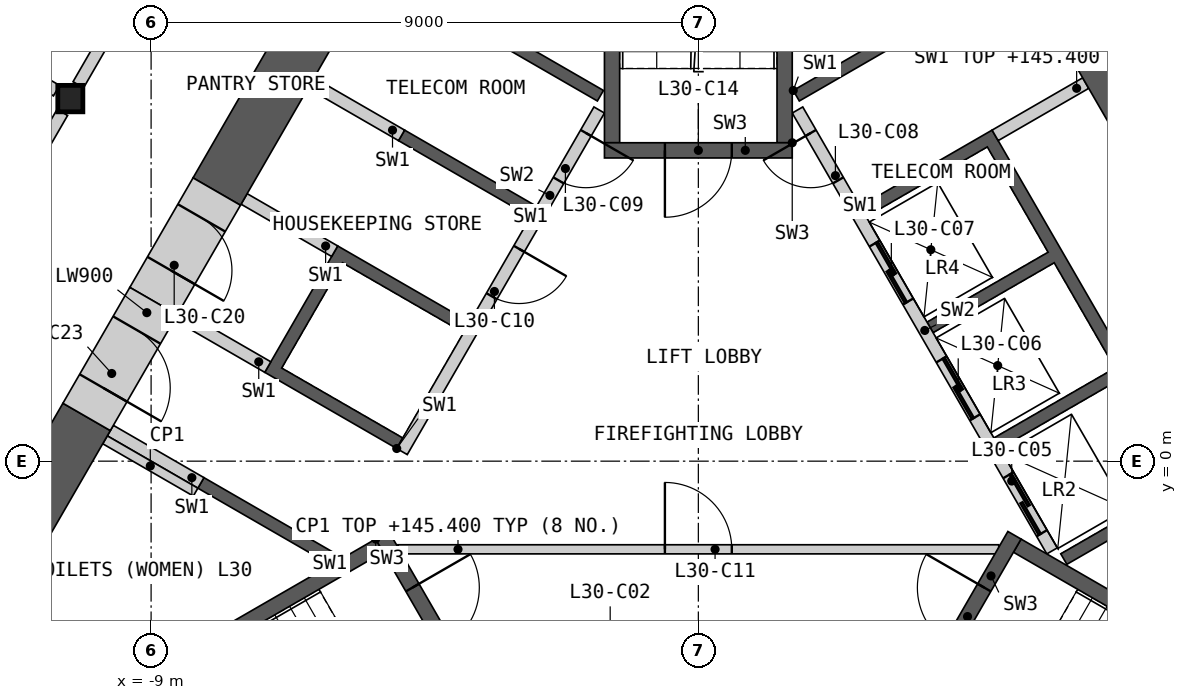
"""IFC4 building model, lengths in metres.
Left out: names, types, materials, properties, quantities, classifications, styles, units other than length and angle.
Written with IfcOpenShell. Run it as: python <this file> out.ifc"""

import sys

from ifc_helpers import new_model, si_unit, direction, frame, frame_2d, origin, origin_2d, place, context, subcontext, project, spatial, polyline, rectangle, i_section, outline, extrude, element, fill, save


model = new_model("IFC4")
c1 = context("Model", 3, precision=1e-05, world=origin(), true_north=direction((0.0, 1.0)))
c2 = subcontext(c1, "Body", "Model", "MODEL_VIEW")
j1 = project(units=[si_unit("LENGTHUNIT", "METRE"), si_unit("PLANEANGLEUNIT", "RADIAN")], contexts=[c1])
p1 = place(None, origin())
s1 = spatial("IfcSite", under=j1, at=p1, CompositionType="ELEMENT")
p2 = place(p1, origin())
s2 = spatial("IfcBuilding", under=s1, at=p2, CompositionType="ELEMENT")
p3 = place(p2, frame((0.0, 0.0, 141.6)))
s3 = spatial("IfcBuildingStorey", under=s2, at=p3, CompositionType="ELEMENT", Elevation=141.6)
p4 = place(p3, frame((-10.328, 5.963, 0.0), z_axis=(0.0, 0.0, 1.0), x_axis=(1.0, 0.0, 0.0)))
e1 = element("IfcColumn", 1, at=p4, inside=s3, PredefinedType="COLUMN", context=c2, shape_type="SweptSolid", body=[
    extrude(i_section(OverallWidth=0.412, OverallDepth=0.435, WebThickness=0.036, FlangeThickness=0.057, at=origin_2d()), origin(), (0.0, 0.0, 1.0), 4.2),
])
p5 = place(p3, origin())
e2 = element("IfcWall", 2, at=p5, inside=s3, PredefinedType="SHEAR", context=c2, shape_type="SweptSolid", body=[
    extrude(outline(polyline([(1.561, 6.097), (3.731, 7.35), (3.831, 7.177), (1.66, 5.924), (1.561, 6.097)])), origin(), (0.0, 0.0, 1.0), 3.8),
])
p6 = place(p3, origin())
e3 = element("IfcWall", 3, at=p6, inside=s3, PredefinedType="SHEAR", context=c2, shape_type="SweptSolid", body=[
    extrude(outline(polyline([(2.66, 4.192), (4.831, 5.445), (8.231, -0.444), (6.061, -1.697), (5.96, -1.524), (7.952, -0.374), (6.952, 1.358), (4.96, 0.208), (4.861, 0.381), (6.852, 1.531), (5.852, 3.263), (3.861, 2.113), (3.76, 2.287), (5.752, 3.437), (4.752, 5.169), (2.76, 4.019), (2.66, 4.192)])), origin(), (0.0, 0.0, 1.0), 3.8),
])
p7 = place(p3, frame((5.817, -1.476, 0.0), z_axis=(0.0, 0.0, 1.0), x_axis=(-0.500002616675, 0.866023893041, 0.0)))
e4 = element("IfcWall", 4, at=p7, inside=s3, PredefinedType="SOLIDWALL", context=c2, shape_type="SweptSolid", body=[
    extrude(rectangle(XDim=8.373, YDim=0.2, at=frame_2d((4.187, 0.0))), origin(), (0.0, 0.0, 1.0), 3.8),
])
p8 = place(p7, frame((0.337, 0.0, 0.0)))
e5 = element("IfcOpeningElement", 5, at=p8, cuts=e4, PredefinedType="OPENING", context=c2, shape_type="SweptSolid", body=[
    extrude(rectangle(XDim=1.1, YDim=2.1, at=frame_2d((0.55, 1.05))), frame((0.0, 0.11, 0.0), z_axis=(0.0, -1.0, 0.0), x_axis=(1.0, 0.0, 0.0)), (0.0, 0.0, 1.0), 0.22),
])
p9 = place(p7, frame((2.537, 0.0, 0.0)))
e6 = element("IfcOpeningElement", 6, at=p9, cuts=e4, PredefinedType="OPENING", context=c2, shape_type="SweptSolid", body=[
    extrude(rectangle(XDim=1.1, YDim=2.1, at=frame_2d((0.55, 1.05))), frame((0.0, 0.11, 0.0), z_axis=(0.0, -1.0, 0.0), x_axis=(1.0, 0.0, 0.0)), (0.0, 0.0, 1.0), 0.22),
])
p10 = place(p7, frame((4.737, 0.0, 0.0)))
e7 = element("IfcOpeningElement", 7, at=p10, cuts=e4, PredefinedType="OPENING", context=c2, shape_type="SweptSolid", body=[
    extrude(rectangle(XDim=1.1, YDim=2.1, at=frame_2d((0.55, 1.05))), frame((0.0, 0.11, 0.0), z_axis=(0.0, -1.0, 0.0), x_axis=(1.0, 0.0, 0.0)), (0.0, 0.0, 1.0), 0.22),
])
p11 = place(p7, frame((7.037, 0.0, 0.0)))
e8 = element("IfcOpeningElement", 8, at=p11, cuts=e4, PredefinedType="OPENING", context=c2, shape_type="SweptSolid", body=[
    extrude(rectangle(XDim=0.9, YDim=2.1, at=frame_2d((0.45, 1.05))), frame((0.0, 0.11, 0.0), z_axis=(0.0, -1.0, 0.0), x_axis=(1.0, 0.0, 0.0)), (0.0, 0.0, 1.0), 0.22),
])
p12 = place(p3, frame((4.881, 5.358, 0.0), z_axis=(0.0, 0.0, 1.0), x_axis=(0.866024871741, 0.500000921525, 0.0)))
e9 = element("IfcWall", 9, at=p12, inside=s3, PredefinedType="SHEAR", context=c2, shape_type="SweptSolid", body=[
    extrude(rectangle(XDim=1.72, YDim=0.2, at=frame_2d((0.86, 0.0))), origin(), (0.0, 0.0, 1.0), 3.8),
])
p13 = place(p3, origin())
e10 = element("IfcWall", 10, at=p13, inside=s3, PredefinedType="SHEAR", context=c2, shape_type="SweptSolid", body=[
    extrude(outline(polyline([(-6.061, -1.697), (-8.231, -0.444), (-8.131, -0.271), (-5.96, -1.524), (-6.061, -1.697)])), origin(), (0.0, 0.0, 1.0), 3.8),
])
p14 = place(p3, origin())
e11 = element("IfcWall", 11, at=p14, inside=s3, PredefinedType="SHEAR", context=c2, shape_type="SweptSolid", body=[
    extrude(outline(polyline([(-4.96, 0.208), (-7.131, 1.461), (-5.931, 3.54), (-3.76, 2.287), (-3.861, 2.113), (-5.852, 3.263), (-6.852, 1.531), (-4.861, 0.381), (-4.96, 0.208)])), origin(), (0.0, 0.0, 1.0), 3.8),
])
p15 = place(p3, origin())
e12 = element("IfcWall", 12, at=p15, inside=s3, PredefinedType="SHEAR", context=c2, shape_type="SweptSolid", body=[
    extrude(outline(polyline([(-2.76, 4.019), (-4.931, 5.272), (-4.831, 5.445), (-2.66, 4.192), (-2.76, 4.019)])), origin(), (0.0, 0.0, 1.0), 3.8),
])
p16 = place(p3, origin())
e13 = element("IfcWall", 13, at=p16, inside=s3, PredefinedType="SHEAR", context=c2, shape_type="SweptSolid", body=[
    extrude(outline(polyline([(-3.731, 7.35), (-1.561, 6.097), (-1.66, 5.924), (-3.831, 7.177), (-3.731, 7.35)])), origin(), (0.0, 0.0, 1.0), 3.8),
])
p17 = place(p3, frame((-1.631, 5.776, 0.0), z_axis=(0.0, 0.0, 1.0), x_axis=(-0.499992876559, -0.866029516466, 0.0)))
e14 = element("IfcWall", 14, at=p17, inside=s3, PredefinedType="SOLIDWALL", context=c2, shape_type="SweptSolid", body=[
    extrude(rectangle(XDim=6.486, YDim=0.2, at=frame_2d((3.243, 0.0))), origin(), (0.0, 0.0, 1.0), 3.8),
])
p18 = place(p17, frame((0.437, 0.0, 0.0)))
e15 = element("IfcOpeningElement", 15, at=p18, cuts=e14, PredefinedType="OPENING", context=c2, shape_type="SweptSolid", body=[
    extrude(rectangle(XDim=0.9, YDim=2.1, at=frame_2d((0.45, 1.05))), frame((0.0, 0.11, 0.0), z_axis=(0.0, -1.0, 0.0), x_axis=(1.0, 0.0, 0.0)), (0.0, 0.0, 1.0), 0.22),
])
p19 = place(p17, frame((2.637, 0.0, 0.0)))
e16 = element("IfcOpeningElement", 16, at=p19, cuts=e14, PredefinedType="OPENING", context=c2, shape_type="SweptSolid", body=[
    extrude(rectangle(XDim=0.9, YDim=2.1, at=frame_2d((0.45, 1.05))), frame((0.0, 0.11, 0.0), z_axis=(0.0, -1.0, 0.0), x_axis=(1.0, 0.0, 0.0)), (0.0, 0.0, 1.0), 0.22),
])
p20 = place(p3, frame((-4.881, 5.358, 0.0), z_axis=(0.0, 0.0, 1.0), x_axis=(-0.866024871741, 0.500000921525, 0.0)))
e17 = element("IfcWall", 17, at=p20, inside=s3, PredefinedType="SHEAR", context=c2, shape_type="SweptSolid", body=[
    extrude(rectangle(XDim=1.72, YDim=0.2, at=frame_2d((0.86, 0.0))), origin(), (0.0, 0.0, 1.0), 3.8),
])
p21 = place(p3, frame((-5.981, 3.453, 0.0), z_axis=(0.0, 0.0, 1.0), x_axis=(-0.866060346521, 0.499939472521, 0.0)))
e18 = element("IfcWall", 18, at=p21, inside=s3, PredefinedType="SHEAR", context=c2, shape_type="SweptSolid", body=[
    extrude(rectangle(XDim=1.72, YDim=0.2, at=frame_2d((0.86, 0.0))), origin(), (0.0, 0.0, 1.0), 3.8),
])
for number, where, z_axis, x_axis in (
    (19, (-7.081, 1.548, 0.0), (0.0, 0.0, 1.0), (-0.866, 0.5, 0.0)),
    (20, (-8.181, -0.357, 0.0), (0.0, 0.0, 1.0), (-0.866, 0.5, 0.0)),
):
    element("IfcWall", number, at=place(p3, frame(where, z_axis=z_axis, x_axis=x_axis)), inside=s3, PredefinedType="SHEAR", context=c2, shape_type="SweptSolid", body=[
        extrude(rectangle(XDim=1.72, YDim=0.2, at=frame_2d((0.86, 0.0))), origin(), (0.0, 0.0, 1.0), 3.8),
    ])
p22 = place(p3, frame((-4.941, -1.45, 0.0), z_axis=(0.0, 0.0, 1.0), x_axis=(1.0, 0.0, 0.0)))
e21 = element("IfcWall", 21, at=p22, inside=s3, PredefinedType="PARTITIONING", context=c2, shape_type="SweptSolid", body=[
    extrude(rectangle(XDim=9.882, YDim=0.15, at=frame_2d((4.941, 0.0))), origin(), (0.0, 0.0, 1.0), 3.8),
])
p23 = place(p22, frame((4.391, 0.0, 0.0)))
e22 = element("IfcOpeningElement", 22, at=p23, cuts=e21, PredefinedType="OPENING", context=c2, shape_type="SweptSolid", body=[
    extrude(rectangle(XDim=1.1, YDim=2.1, at=frame_2d((0.55, 1.05))), frame((0.0, 0.085, 0.0), z_axis=(0.0, -1.0, 0.0), x_axis=(1.0, 0.0, 0.0)), (0.0, 0.0, 1.0), 0.17),
])
p24 = place(p3, origin())
e23 = element("IfcWall", 23, at=p24, inside=s3, PredefinedType="SHEAR", context=c2, shape_type="SweptSolid", body=[
    extrude(outline(polyline([(-5.307, -1.281), (-10.374, -4.206), (-10.032, -4.298), (-5.182, -1.498), (-5.307, -1.281)])), origin(), (0.0, 0.0, 1.0), 3.8),
])
p25 = place(p3, frame((-5.199, -1.219, 0.0), z_axis=(0.0, 0.0, 1.0), x_axis=(0.499982516597, -0.866035497597, 0.0)))
e24 = element("IfcWall", 24, at=p25, inside=s3, PredefinedType="SHEAR", context=c2, shape_type="SweptSolid", body=[
    extrude(rectangle(XDim=3.088, YDim=0.25, at=frame_2d((1.544, 0.0))), origin(), (0.0, 0.0, 1.0), 3.8),
])
p26 = place(p25, frame((0.994, 0.0, 0.0)))
e25 = element("IfcOpeningElement", 25, at=p26, cuts=e24, PredefinedType="OPENING", context=c2, shape_type="SweptSolid", body=[
    extrude(rectangle(XDim=1.1, YDim=2.1, at=frame_2d((0.55, 1.05))), frame((0.0, 0.135, 0.0), z_axis=(0.0, -1.0, 0.0), x_axis=(1.0, 0.0, 0.0)), (0.0, 0.0, 1.0), 0.27),
])
p27 = place(p3, origin())
e26 = element("IfcWall", 26, at=p27, inside=s3, PredefinedType="SHEAR", context=c2, shape_type="SweptSolid", body=[
    extrude(outline(polyline([(10.032, -4.298), (10.374, -4.206), (5.307, -1.281), (5.182, -1.498), (10.032, -4.298)])), origin(), (0.0, 0.0, 1.0), 3.8),
])
p28 = place(p3, frame((3.655, -3.893, 0.0), z_axis=(0.0, 0.0, 1.0), x_axis=(0.499982516597, 0.866035497597, 0.0)))
e27 = element("IfcWall", 27, at=p28, inside=s3, PredefinedType="SHEAR", context=c2, shape_type="SweptSolid", body=[
    extrude(rectangle(XDim=3.088, YDim=0.25, at=frame_2d((1.544, 0.0))), origin(), (0.0, 0.0, 1.0), 3.8),
])
p29 = place(p28, frame((0.994, 0.0, 0.0)))
e28 = element("IfcOpeningElement", 28, at=p29, cuts=e27, PredefinedType="OPENING", context=c2, shape_type="SweptSolid", body=[
    extrude(rectangle(XDim=1.1, YDim=2.1, at=frame_2d((0.55, 1.05))), frame((0.0, 0.135, 0.0), z_axis=(0.0, -1.0, 0.0), x_axis=(1.0, 0.0, 0.0)), (0.0, 0.0, 1.0), 0.27),
])
p30 = place(p3, origin())
e29 = element("IfcWall", 29, at=p30, inside=s3, PredefinedType="SHEAR", context=c2, shape_type="SweptSolid", body=[
    extrude(outline(polyline([(1.544, 5.237), (1.544, 11.087), (1.294, 10.837), (1.294, 5.237), (1.544, 5.237)])), origin(), (0.0, 0.0, 1.0), 3.8),
])
p31 = place(p3, origin())
e30 = element("IfcWall", 30, at=p31, inside=s3, PredefinedType="SHEAR", context=c2, shape_type="SweptSolid", body=[
    extrude(outline(polyline([(-1.294, 10.837), (-1.544, 11.087), (-1.544, 5.237), (-1.294, 5.237), (-1.294, 10.837)])), origin(), (0.0, 0.0, 1.0), 3.8),
])
p32 = place(p3, frame((1.544, 5.112, 0.0), z_axis=(0.0, 0.0, 1.0), x_axis=(-1.0, 0.0, 0.0)))
e31 = element("IfcWall", 31, at=p32, inside=s3, PredefinedType="SHEAR", context=c2, shape_type="SweptSolid", body=[
    extrude(rectangle(XDim=3.088, YDim=0.25, at=frame_2d((1.544, 0.0))), origin(), (0.0, 0.0, 1.0), 3.8),
])
p33 = place(p32, frame((0.994, 0.0, 0.0)))
e32 = element("IfcOpeningElement", 32, at=p33, cuts=e31, PredefinedType="OPENING", context=c2, shape_type="SweptSolid", body=[
    extrude(rectangle(XDim=1.1, YDim=2.1, at=frame_2d((0.55, 1.05))), frame((0.0, 0.135, 0.0), z_axis=(0.0, -1.0, 0.0), x_axis=(1.0, 0.0, 0.0)), (0.0, 0.0, 1.0), 0.27),
])
p34 = place(p3, frame((-8.268, -0.509, 0.0), z_axis=(0.0, 0.0, 1.0), x_axis=(-0.866024871741, 0.500000921525, 0.0)))
e33 = element("IfcWall", 33, at=p34, inside=s3, PredefinedType="PARTITIONING", context=c2, shape_type="SweptSolid", body=[
    extrude(rectangle(XDim=1.72, YDim=0.15, at=frame_2d((0.86, 0.0))), origin(), (0.0, 0.0, 1.0), 3.8),
])
p35 = place(p3, frame((10.521, -0.07, 0.0), z_axis=(0.0, 0.0, 1.0), x_axis=(-0.499997384719, 0.866026913713, 0.0)))
e34 = element("IfcWall", 34, at=p35, inside=s3, PredefinedType="SHEAR", context=c2, shape_type="SweptSolid", body=[
    extrude(rectangle(XDim=10.249, YDim=0.9, at=frame_2d((5.125, 0.0))), origin(), (0.0, 0.0, 1.0), 3.8),
])
p36 = place(p3, frame((-3.512, 12.069, 0.0), z_axis=(0.0, 0.0, 1.0), x_axis=(-0.500002126466, -0.866024176065, 0.0)))
e35 = element("IfcWall", 35, at=p36, inside=s3, PredefinedType="SHEAR", context=c2, shape_type="SweptSolid", body=[
    extrude(rectangle(XDim=8.816, YDim=0.9, at=frame_2d((4.408, 0.0))), origin(), (0.0, 0.0, 1.0), 3.8),
])
p37 = place(p3, frame((-10.06, 0.728, 0.0), z_axis=(0.0, 0.0, 1.0), x_axis=(-0.500002975332, -0.866023685969, 0.0)))
e36 = element("IfcWall", 36, at=p37, inside=s3, PredefinedType="SHEAR", context=c2, shape_type="SweptSolid", body=[
    extrude(rectangle(XDim=6.429, YDim=0.9, at=frame_2d((3.214, 0.0))), origin(), (0.0, 0.0, 1.0), 3.8),
])
p38 = place(p3, frame((-7.92, 4.434, 0.0), z_axis=(0.0, 0.0, 1.0), x_axis=(-0.499939227269, -0.866060488094, 0.0)))
e37 = element("IfcWall", 37, at=p38, inside=s3, PredefinedType="SHEAR", context=c2, shape_type="SweptSolid", body=[
    extrude(rectangle(XDim=2.08, YDim=0.9, at=frame_2d((1.04, 0.0))), origin(), (0.0, 0.0, 1.0), 3.8),
])
p39 = place(p38, frame((0.5, 0.0, 0.0)))
e38 = element("IfcOpeningElement", 38, at=p39, cuts=e37, PredefinedType="OPENING", context=c2, shape_type="SweptSolid", body=[
    extrude(rectangle(XDim=1.0, YDim=2.1, at=frame_2d((0.5, 1.05))), frame((0.0, 0.46, 0.0), z_axis=(0.0, -1.0, 0.0), x_axis=(1.0, 0.0, 0.0)), (0.0, 0.0, 1.0), 0.92),
])
p40 = place(p3, frame((-8.96, 2.633, 0.0), z_axis=(0.0, 0.0, 1.0), x_axis=(-0.50002983664, -0.866008176907, 0.0)))
e39 = element("IfcWall", 39, at=p40, inside=s3, PredefinedType="SHEAR", context=c2, shape_type="SweptSolid", body=[
    extrude(rectangle(XDim=2.2, YDim=0.9, at=frame_2d((1.1, 0.0))), origin(), (0.0, 0.0, 1.0), 3.8),
])
p41 = place(p40, frame((0.55, 0.0, 0.0)))
e40 = element("IfcOpeningElement", 40, at=p41, cuts=e39, PredefinedType="OPENING", context=c2, shape_type="SweptSolid", body=[
    extrude(rectangle(XDim=1.1, YDim=2.1, at=frame_2d((0.55, 1.05))), frame((0.0, 0.46, 0.0), z_axis=(0.0, -1.0, 0.0), x_axis=(1.0, 0.0, 0.0)), (0.0, 0.0, 1.0), 0.92),
])
p42 = place(p3, frame((-15.361, -2.754, 0.0), z_axis=(0.0, 0.0, 1.0), x_axis=(0.500004141693, 0.866023012564, 0.0)))
e41 = element("IfcWall", 41, at=p42, inside=s3, PredefinedType="PARTITIONING", context=c2, shape_type="SweptSolid", body=[
    extrude(rectangle(XDim=9.803, YDim=0.2, at=frame_2d((4.902, 0.0))), origin(), (0.0, 0.0, 1.0), 3.8),
])
p43 = place(p42, frame((4.452, 0.0, 0.0)))
e42 = element("IfcOpeningElement", 42, at=p43, cuts=e41, PredefinedType="OPENING", context=c2, shape_type="SweptSolid", body=[
    extrude(rectangle(XDim=1.0, YDim=2.1, at=frame_2d((0.5, 1.05))), frame((0.0, 0.11, 0.0), z_axis=(0.0, -1.0, 0.0), x_axis=(1.0, 0.0, 0.0)), (0.0, 0.0, 1.0), 0.22),
])
p44 = place(p3, frame((5.295, 14.68, 0.0), z_axis=(0.0, 0.0, 1.0), x_axis=(0.500012035596, -0.866018454918, 0.0)))
e43 = element("IfcWall", 43, at=p44, inside=s3, PredefinedType="PARTITIONING", context=c2, shape_type="SweptSolid", body=[
    extrude(rectangle(XDim=9.803, YDim=0.2, at=frame_2d((4.902, 0.0))), origin(), (0.0, 0.0, 1.0), 3.8),
])
p45 = place(p44, frame((4.052, 0.0, 0.0)))
e44 = element("IfcOpeningElement", 44, at=p45, cuts=e43, PredefinedType="OPENING", context=c2, shape_type="SweptSolid", body=[
    extrude(rectangle(XDim=1.8, YDim=2.1, at=frame_2d((0.9, 1.05))), frame((0.0, 0.11, 0.0), z_axis=(0.0, -1.0, 0.0), x_axis=(1.0, 0.0, 0.0)), (0.0, 0.0, 1.0), 0.22),
])
p46 = place(p3, frame((-10.197, 6.19, 0.0), z_axis=(0.0, 0.0, 1.0), x_axis=(0.500012035596, 0.866018454918, 0.0)))
e45 = element("IfcWall", 45, at=p46, inside=s3, PredefinedType="PARTITIONING", context=c2, shape_type="SweptSolid", body=[
    extrude(rectangle(XDim=9.803, YDim=0.2, at=frame_2d((4.902, 0.0))), origin(), (0.0, 0.0, 1.0), 3.8),
])
p47 = place(p46, frame((6.853, 0.0, 0.0)))
e46 = element("IfcOpeningElement", 46, at=p47, cuts=e45, PredefinedType="OPENING", context=c2, shape_type="SweptSolid", body=[
    extrude(rectangle(XDim=1.0, YDim=2.1, at=frame_2d((0.5, 1.05))), frame((0.0, 0.11, 0.0), z_axis=(0.0, -1.0, 0.0), x_axis=(1.0, 0.0, 0.0)), (0.0, 0.0, 1.0), 0.22),
])
p48 = place(p46, frame((1.851, 0.0, 0.0)))
e47 = element("IfcOpeningElement", 47, at=p48, cuts=e45, PredefinedType="OPENING", context=c2, shape_type="SweptSolid", body=[
    extrude(rectangle(XDim=1.0, YDim=2.1, at=frame_2d((0.5, 1.05))), frame((0.0, 0.11, 0.0), z_axis=(0.0, -1.0, 0.0), x_axis=(1.0, 0.0, 0.0)), (0.0, 0.0, 1.0), 0.22),
])
p49 = place(p3, frame((-21.536, 12.434, 0.0), z_axis=(0.0, 0.0, 1.0), x_axis=(0.86602461759, -0.500001361726, 0.0)))
e48 = element("IfcWall", 48, at=p49, inside=s3, PredefinedType="PARTITIONING", context=c2, shape_type="SweptSolid", body=[
    extrude(rectangle(XDim=12.679, YDim=0.2, at=frame_2d((6.34, 0.0))), origin(), (0.0, 0.0, 1.0), 2.885),
])
p50 = place(p8, origin())
e49 = element("IfcDoor", 49, at=p50, inside=s3, OperationType="SLIDING_TO_LEFT", PredefinedType="DOOR", context=c2, shape_type="SweptSolid", body=[
    extrude(rectangle(XDim=1.1, YDim=2.1, at=frame_2d((0.55, 1.05))), frame((0.0, 0.025, 0.0), z_axis=(0.0, -1.0, 0.0), x_axis=(1.0, 0.0, 0.0)), (0.0, 0.0, 1.0), 0.05),
])
fill(e5, e49)
p51 = place(p9, origin())
e50 = element("IfcDoor", 50, at=p51, inside=s3, OperationType="SLIDING_TO_LEFT", PredefinedType="DOOR", context=c2, shape_type="SweptSolid", body=[
    extrude(rectangle(XDim=1.1, YDim=2.1, at=frame_2d((0.55, 1.05))), frame((0.0, 0.025, 0.0), z_axis=(0.0, -1.0, 0.0), x_axis=(1.0, 0.0, 0.0)), (0.0, 0.0, 1.0), 0.05),
])
fill(e6, e50)
p52 = place(p10, origin())
e51 = element("IfcDoor", 51, at=p52, inside=s3, OperationType="SLIDING_TO_LEFT", PredefinedType="DOOR", context=c2, shape_type="SweptSolid", body=[
    extrude(rectangle(XDim=1.1, YDim=2.1, at=frame_2d((0.55, 1.05))), frame((0.0, 0.025, 0.0), z_axis=(0.0, -1.0, 0.0), x_axis=(1.0, 0.0, 0.0)), (0.0, 0.0, 1.0), 0.05),
])
fill(e7, e51)
p53 = place(p11, origin())
e52 = element("IfcDoor", 52, at=p53, inside=s3, OperationType="SINGLE_SWING_RIGHT", PredefinedType="DOOR", context=c2, shape_type="SweptSolid", body=[
    extrude(rectangle(XDim=0.9, YDim=2.1, at=frame_2d((0.45, 1.05))), frame((0.0, 0.025, 0.0), z_axis=(0.0, -1.0, 0.0), x_axis=(1.0, 0.0, 0.0)), (0.0, 0.0, 1.0), 0.05),
])
fill(e8, e52)
p54 = place(p18, origin())
e53 = element("IfcDoor", 53, at=p54, inside=s3, OperationType="SINGLE_SWING_LEFT", PredefinedType="DOOR", context=c2, shape_type="SweptSolid", body=[
    extrude(rectangle(XDim=0.9, YDim=2.1, at=frame_2d((0.45, 1.05))), frame((0.0, 0.025, 0.0), z_axis=(0.0, -1.0, 0.0), x_axis=(1.0, 0.0, 0.0)), (0.0, 0.0, 1.0), 0.05),
])
fill(e15, e53)
p55 = place(p19, origin())
e54 = element("IfcDoor", 54, at=p55, inside=s3, OperationType="SINGLE_SWING_LEFT", PredefinedType="DOOR", context=c2, shape_type="SweptSolid", body=[
    extrude(rectangle(XDim=0.9, YDim=2.1, at=frame_2d((0.45, 1.05))), frame((0.0, 0.025, 0.0), z_axis=(0.0, -1.0, 0.0), x_axis=(1.0, 0.0, 0.0)), (0.0, 0.0, 1.0), 0.05),
])
fill(e16, e54)
p56 = place(p23, origin())
e55 = element("IfcDoor", 55, at=p56, inside=s3, OperationType="SINGLE_SWING_LEFT", PredefinedType="DOOR", context=c2, shape_type="SweptSolid", body=[
    extrude(rectangle(XDim=1.1, YDim=2.1, at=frame_2d((0.55, 1.05))), frame((0.0, 0.025, 0.0), z_axis=(0.0, -1.0, 0.0), x_axis=(1.0, 0.0, 0.0)), (0.0, 0.0, 1.0), 0.05),
])
fill(e22, e55)
p57 = place(p26, origin())
e56 = element("IfcDoor", 56, at=p57, inside=s3, OperationType="SINGLE_SWING_LEFT", PredefinedType="DOOR", context=c2, shape_type="SweptSolid", body=[
    extrude(rectangle(XDim=1.1, YDim=2.1, at=frame_2d((0.55, 1.05))), frame((0.0, 0.025, 0.0), z_axis=(0.0, -1.0, 0.0), x_axis=(1.0, 0.0, 0.0)), (0.0, 0.0, 1.0), 0.05),
])
fill(e25, e56)
p58 = place(p29, origin())
e57 = element("IfcDoor", 57, at=p58, inside=s3, OperationType="SINGLE_SWING_RIGHT", PredefinedType="DOOR", context=c2, shape_type="SweptSolid", body=[
    extrude(rectangle(XDim=1.1, YDim=2.1, at=frame_2d((0.55, 1.05))), frame((0.0, 0.025, 0.0), z_axis=(0.0, -1.0, 0.0), x_axis=(1.0, 0.0, 0.0)), (0.0, 0.0, 1.0), 0.05),
])
fill(e28, e57)
p59 = place(p33, origin())
e58 = element("IfcDoor", 58, at=p59, inside=s3, OperationType="SINGLE_SWING_RIGHT", PredefinedType="DOOR", context=c2, shape_type="SweptSolid", body=[
    extrude(rectangle(XDim=1.1, YDim=2.1, at=frame_2d((0.55, 1.05))), frame((0.0, 0.025, 0.0), z_axis=(0.0, -1.0, 0.0), x_axis=(1.0, 0.0, 0.0)), (0.0, 0.0, 1.0), 0.05),
])
fill(e32, e58)
p60 = place(p39, origin())
e59 = element("IfcDoor", 59, at=p60, inside=s3, OperationType="SINGLE_SWING_RIGHT", PredefinedType="DOOR", context=c2, shape_type="SweptSolid", body=[
    extrude(rectangle(XDim=1.0, YDim=2.1, at=frame_2d((0.5, 1.05))), frame((0.0, 0.205, 0.0), z_axis=(0.0, -1.0, 0.0), x_axis=(1.0, 0.0, 0.0)), (0.0, 0.0, 1.0), 0.05),
])
fill(e38, e59)
p61 = place(p41, origin())
e60 = element("IfcDoor", 60, at=p61, inside=s3, OperationType="SINGLE_SWING_RIGHT", PredefinedType="DOOR", context=c2, shape_type="SweptSolid", body=[
    extrude(rectangle(XDim=1.1, YDim=2.1, at=frame_2d((0.55, 1.05))), frame((0.0, 0.205, 0.0), z_axis=(0.0, -1.0, 0.0), x_axis=(1.0, 0.0, 0.0)), (0.0, 0.0, 1.0), 0.05),
])
fill(e40, e60)
save(model, sys.argv[1])
